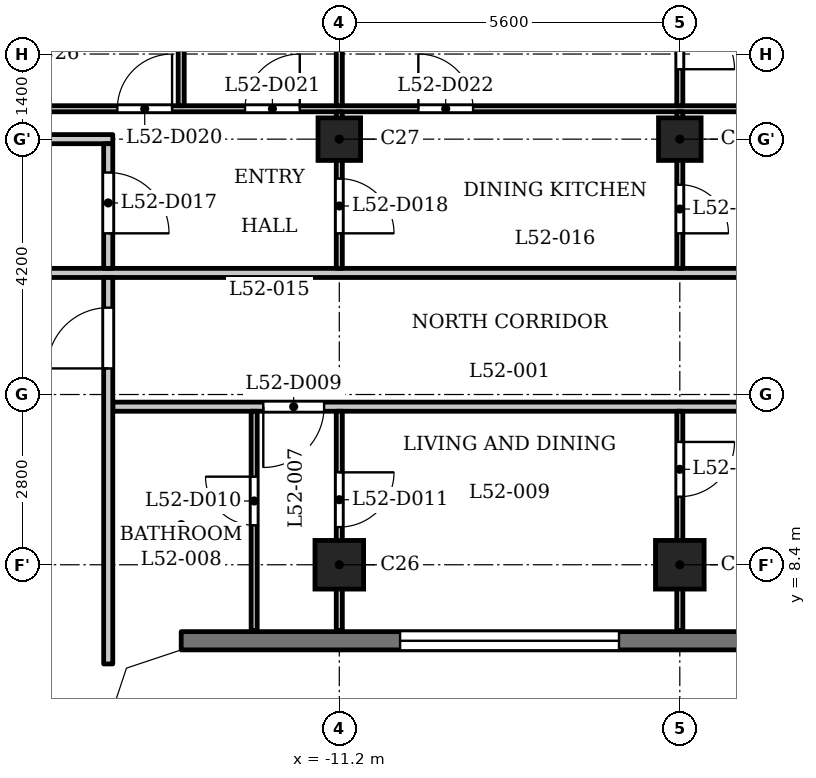
"""IFC4 building model, lengths in metres.
Left out: names, types, materials, properties, quantities, classifications, styles, units other than length and angle.
Written with IfcOpenShell. Run it as: python <this file> out.ifc"""

import sys

from ifc_helpers import new_model, si_unit, direction, frame, frame_2d, origin, origin_2d, place, context, subcontext, project, spatial, polyline, rectangle, outline, extrude, element, fill, save


model = new_model("IFC4")
c1 = context("Model", 3, precision=1e-05, world=origin(), true_north=direction((0.0, 1.0)))
c2 = subcontext(c1, "Body", "Model", "MODEL_VIEW")
j1 = project(units=[si_unit("LENGTHUNIT", "METRE"), si_unit("PLANEANGLEUNIT", "RADIAN")], contexts=[c1])
p1 = place(None, origin())
s1 = spatial("IfcSite", under=j1, at=p1, CompositionType="ELEMENT")
p2 = place(p1, origin())
s2 = spatial("IfcBuilding", under=s1, at=p2, CompositionType="ELEMENT")
p3 = place(p2, frame((0.0, 0.0, 202.9)))
s3 = spatial("IfcBuildingStorey", under=s2, at=p3, CompositionType="ELEMENT", Elevation=202.9)
for number, where, z_axis, x_axis in (
    (1, (-11.2, 8.4, 0.0), (0.0, 0.0, 1.0), (1.0, 0.0, 0.0)),
    (2, (-5.6, 8.4, 0.0), (0.0, 0.0, 1.0), (1.0, 0.0, 0.0)),
):
    element("IfcColumn", number, at=place(p3, frame(where, z_axis=z_axis, x_axis=x_axis)), inside=s3, PredefinedType="COLUMN", context=c2, shape_type="SweptSolid", body=[
        extrude(rectangle(XDim=0.8, YDim=0.8, at=origin_2d()), origin(), (0.0, 0.0, 1.0), 3.5),
    ])
for number, where, z_axis, x_axis in (
    (3, (-11.2, 15.4, 0.0), (0.0, 0.0, 1.0), (1.0, 0.0, 0.0)),
    (4, (-5.6, 15.4, 0.0), (0.0, 0.0, 1.0), (1.0, 0.0, 0.0)),
):
    element("IfcColumn", number, at=place(p3, frame(where, z_axis=z_axis, x_axis=x_axis)), inside=s3, PredefinedType="COLUMN", context=c2, shape_type="SweptSolid", body=[
        extrude(rectangle(XDim=0.7, YDim=0.7, at=origin_2d()), origin(), (0.0, 0.0, 1.0), 3.5),
    ])
p4 = place(p3, frame((-13.8, 7.15, 0.0), z_axis=(0.0, 0.0, 1.0), x_axis=(1.0, 0.0, 0.0)))
e5 = element("IfcWall", 5, at=p4, inside=s3, PredefinedType="SOLIDWALL", context=c2, shape_type="SweptSolid", body=[
    extrude(rectangle(XDim=27.6, YDim=0.3, at=frame_2d((13.8, 0.0))), origin(), (0.0, 0.0, 1.0), 3.2),
])
p5 = place(p4, frame((3.6, 0.0, 1.2)))
e6 = element("IfcOpeningElement", 6, at=p5, cuts=e5, PredefinedType="OPENING", context=c2, shape_type="SweptSolid", body=[
    extrude(rectangle(XDim=3.6, YDim=0.95, at=frame_2d((1.8, 0.475))), frame((0.0, 0.16, 0.0), z_axis=(0.0, -1.0, 0.0), x_axis=(1.0, 0.0, 0.0)), (0.0, 0.0, 1.0), 0.32),
])
p6 = place(p4, frame((9.2, 0.0, 1.2)))
e7 = element("IfcOpeningElement", 7, at=p6, cuts=e5, PredefinedType="OPENING", context=c2, shape_type="SweptSolid", body=[
    extrude(rectangle(XDim=3.6, YDim=0.95, at=frame_2d((1.8, 0.475))), frame((0.0, 0.16, 0.0), z_axis=(0.0, -1.0, 0.0), x_axis=(1.0, 0.0, 0.0)), (0.0, 0.0, 1.0), 0.32),
])
p7 = place(p4, frame((14.4, 0.0, 0.6)))
e8 = element("IfcOpeningElement", 8, at=p7, cuts=e5, PredefinedType="OPENING", context=c2, shape_type="SweptSolid", body=[
    extrude(rectangle(XDim=1.2, YDim=1.55, at=frame_2d((0.6, 0.775))), frame((0.0, 0.16, 0.0), z_axis=(0.0, -1.0, 0.0), x_axis=(1.0, 0.0, 0.0)), (0.0, 0.0, 1.0), 0.32),
])
p8 = place(p4, frame((16.9, 0.0, 0.9)))
e9 = element("IfcOpeningElement", 9, at=p8, cuts=e5, PredefinedType="OPENING", context=c2, shape_type="SweptSolid", body=[
    extrude(rectangle(XDim=1.8, YDim=1.25, at=frame_2d((0.9, 0.625))), frame((0.0, 0.16, 0.0), z_axis=(0.0, -1.0, 0.0), x_axis=(1.0, 0.0, 0.0)), (0.0, 0.0, 1.0), 0.32),
])
p9 = place(p4, frame((20.4, 0.0, 1.2)))
e10 = element("IfcOpeningElement", 10, at=p9, cuts=e5, PredefinedType="OPENING", context=c2, shape_type="SweptSolid", body=[
    extrude(rectangle(XDim=3.6, YDim=0.95, at=frame_2d((1.8, 0.475))), frame((0.0, 0.16, 0.0), z_axis=(0.0, -1.0, 0.0), x_axis=(1.0, 0.0, 0.0)), (0.0, 0.0, 1.0), 0.32),
])
p10 = place(p4, frame((25.438, 0.0, 0.9)))
e11 = element("IfcOpeningElement", 11, at=p10, cuts=e5, PredefinedType="OPENING", context=c2, shape_type="SweptSolid", body=[
    extrude(rectangle(XDim=1.8, YDim=1.25, at=frame_2d((0.9, 0.625))), frame((0.0, 0.16, 0.0), z_axis=(0.0, -1.0, 0.0), x_axis=(1.0, 0.0, 0.0)), (0.0, 0.0, 1.0), 0.32),
])
p11 = place(p3, frame((-14.925, 11.0, 0.0), z_axis=(0.0, 0.0, 1.0), x_axis=(1.0, 0.0, 0.0)))
e12 = element("IfcWall", 12, at=p11, inside=s3, PredefinedType="PARTITIONING", context=c2, shape_type="SweptSolid", body=[
    extrude(rectangle(XDim=29.85, YDim=0.15, at=frame_2d((14.925, 0.0))), origin(), (0.0, 0.0, 1.0), 3.2),
])
p12 = place(p11, frame((2.475, 0.0, 0.0)))
e13 = element("IfcOpeningElement", 13, at=p12, cuts=e12, PredefinedType="OPENING", context=c2, shape_type="SweptSolid", body=[
    extrude(rectangle(XDim=1.0, YDim=2.1, at=frame_2d((0.5, 1.05))), frame((0.0, 0.085, 0.0), z_axis=(0.0, -1.0, 0.0), x_axis=(1.0, 0.0, 0.0)), (0.0, 0.0, 1.0), 0.17),
])
p13 = place(p11, frame((17.975, 0.0, 0.0)))
e14 = element("IfcOpeningElement", 14, at=p13, cuts=e12, PredefinedType="OPENING", context=c2, shape_type="SweptSolid", body=[
    extrude(rectangle(XDim=1.0, YDim=2.1, at=frame_2d((0.5, 1.05))), frame((0.0, 0.085, 0.0), z_axis=(0.0, -1.0, 0.0), x_axis=(1.0, 0.0, 0.0)), (0.0, 0.0, 1.0), 0.17),
])
p14 = place(p3, frame((-17.4, 13.2, 0.0), z_axis=(0.0, 0.0, 1.0), x_axis=(1.0, 0.0, 0.0)))
e15 = element("IfcWall", 15, at=p14, inside=s3, PredefinedType="PARTITIONING", context=c2, shape_type="SweptSolid", body=[
    extrude(rectangle(XDim=34.8, YDim=0.15, at=frame_2d((17.4, 0.0))), origin(), (0.0, 0.0, 1.0), 3.2),
])
p15 = place(p14, frame((0.25, 0.0, 0.0)))
e16 = element("IfcOpeningElement", 16, at=p15, cuts=e15, PredefinedType="OPENING", context=c2, shape_type="SweptSolid", body=[
    extrude(rectangle(XDim=1.0, YDim=2.1, at=frame_2d((0.5, 1.05))), frame((0.0, 0.085, 0.0), z_axis=(0.0, -1.0, 0.0), x_axis=(1.0, 0.0, 0.0)), (0.0, 0.0, 1.0), 0.17),
])
p16 = place(p14, frame((33.65, 0.0, 0.0)))
e17 = element("IfcOpeningElement", 17, at=p16, cuts=e15, PredefinedType="OPENING", context=c2, shape_type="SweptSolid", body=[
    extrude(rectangle(XDim=1.0, YDim=2.1, at=frame_2d((0.5, 1.05))), frame((0.0, 0.085, 0.0), z_axis=(0.0, -1.0, 0.0), x_axis=(1.0, 0.0, 0.0)), (0.0, 0.0, 1.0), 0.17),
])
p17 = place(p3, frame((-24.684, 15.4, 0.0), z_axis=(0.0, 0.0, 1.0), x_axis=(1.0, 0.0, 0.0)))
e18 = element("IfcWall", 18, at=p17, inside=s3, PredefinedType="PARTITIONING", context=c2, shape_type="SweptSolid", body=[
    extrude(rectangle(XDim=9.759, YDim=0.15, at=frame_2d((4.879, 0.0))), origin(), (0.0, 0.0, 1.0), 3.2),
])
p18 = place(p17, frame((0.984, 0.0, 0.0)))
e19 = element("IfcOpeningElement", 19, at=p18, cuts=e18, PredefinedType="OPENING", context=c2, shape_type="SweptSolid", body=[
    extrude(rectangle(XDim=1.0, YDim=2.1, at=frame_2d((0.5, 1.05))), frame((0.0, 0.085, 0.0), z_axis=(0.0, -1.0, 0.0), x_axis=(1.0, 0.0, 0.0)), (0.0, 0.0, 1.0), 0.17),
])
p19 = place(p3, frame((-16.725, 15.9, 0.0), z_axis=(0.0, 0.0, 1.0), x_axis=(1.0, 0.0, 0.0)))
e20 = element("IfcWall", 20, at=p19, inside=s3, PredefinedType="PARTITIONING", context=c2, shape_type="SweptSolid", body=[
    extrude(rectangle(XDim=33.45, YDim=0.1, at=frame_2d((16.725, 0.0))), origin(), (0.0, 0.0, 1.0), 3.2),
])
p20 = place(p19, frame((1.875, 0.0, 0.0)))
e21 = element("IfcOpeningElement", 21, at=p20, cuts=e20, PredefinedType="OPENING", context=c2, shape_type="SweptSolid", body=[
    extrude(rectangle(XDim=0.9, YDim=2.1, at=frame_2d((0.45, 1.05))), frame((0.0, 0.06, 0.0), z_axis=(0.0, -1.0, 0.0), x_axis=(1.0, 0.0, 0.0)), (0.0, 0.0, 1.0), 0.12),
])
p21 = place(p19, frame((3.975, 0.0, 0.0)))
e22 = element("IfcOpeningElement", 22, at=p21, cuts=e20, PredefinedType="OPENING", context=c2, shape_type="SweptSolid", body=[
    extrude(rectangle(XDim=0.9, YDim=2.1, at=frame_2d((0.45, 1.05))), frame((0.0, 0.06, 0.0), z_axis=(0.0, -1.0, 0.0), x_axis=(1.0, 0.0, 0.0)), (0.0, 0.0, 1.0), 0.12),
])
p22 = place(p19, frame((6.825, 0.0, 0.0)))
e23 = element("IfcOpeningElement", 23, at=p22, cuts=e20, PredefinedType="OPENING", context=c2, shape_type="SweptSolid", body=[
    extrude(rectangle(XDim=0.9, YDim=2.1, at=frame_2d((0.45, 1.05))), frame((0.0, 0.06, 0.0), z_axis=(0.0, -1.0, 0.0), x_axis=(1.0, 0.0, 0.0)), (0.0, 0.0, 1.0), 0.12),
])
p23 = place(p19, frame((28.975, 0.0, 0.0)))
e24 = element("IfcOpeningElement", 24, at=p23, cuts=e20, PredefinedType="OPENING", context=c2, shape_type="SweptSolid", body=[
    extrude(rectangle(XDim=0.9, YDim=2.1, at=frame_2d((0.45, 1.05))), frame((0.0, 0.06, 0.0), z_axis=(0.0, -1.0, 0.0), x_axis=(1.0, 0.0, 0.0)), (0.0, 0.0, 1.0), 0.12),
])
p24 = place(p19, frame((30.725, 0.0, 0.0)))
e25 = element("IfcOpeningElement", 25, at=p24, cuts=e20, PredefinedType="OPENING", context=c2, shape_type="SweptSolid", body=[
    extrude(rectangle(XDim=0.9, YDim=2.1, at=frame_2d((0.45, 1.05))), frame((0.0, 0.06, 0.0), z_axis=(0.0, -1.0, 0.0), x_axis=(1.0, 0.0, 0.0)), (0.0, 0.0, 1.0), 0.12),
])
p25 = place(p19, frame((25.625, 0.0, 0.0)))
e26 = element("IfcOpeningElement", 26, at=p25, cuts=e20, PredefinedType="OPENING", context=c2, shape_type="SweptSolid", body=[
    extrude(rectangle(XDim=0.9, YDim=2.1, at=frame_2d((0.45, 1.05))), frame((0.0, 0.06, 0.0), z_axis=(0.0, -1.0, 0.0), x_axis=(1.0, 0.0, 0.0)), (0.0, 0.0, 1.0), 0.12),
])
p26 = place(p3, frame((-15.0, 6.769, 0.0), z_axis=(0.0, 0.0, 1.0), x_axis=(0.0, 1.0, 0.0)))
e27 = element("IfcWall", 27, at=p26, inside=s3, PredefinedType="PARTITIONING", context=c2, shape_type="SweptSolid", body=[
    extrude(rectangle(XDim=6.356, YDim=0.15, at=frame_2d((3.178, 0.0))), origin(), (0.0, 0.0, 1.0), 3.2),
])
p27 = place(p26, frame((4.86, 0.0, 0.0)))
e28 = element("IfcOpeningElement", 28, at=p27, cuts=e27, PredefinedType="OPENING", context=c2, shape_type="SweptSolid", body=[
    extrude(rectangle(XDim=1.0, YDim=2.1, at=frame_2d((0.5, 1.05))), frame((0.0, 0.085, 0.0), z_axis=(0.0, -1.0, 0.0), x_axis=(1.0, 0.0, 0.0)), (0.0, 0.0, 1.0), 0.17),
])
p28 = place(p3, frame((-15.0, 13.275, 0.0), z_axis=(0.0, 0.0, 1.0), x_axis=(0.0, 1.0, 0.0)))
e29 = element("IfcWall", 29, at=p28, inside=s3, PredefinedType="PARTITIONING", context=c2, shape_type="SweptSolid", body=[
    extrude(rectangle(XDim=2.05, YDim=0.15, at=frame_2d((1.025, 0.0))), origin(), (0.0, 0.0, 1.0), 3.2),
])
p29 = place(p28, frame((0.576, 0.0, 0.0)))
e30 = element("IfcOpeningElement", 30, at=p29, cuts=e29, PredefinedType="OPENING", context=c2, shape_type="SweptSolid", body=[
    extrude(rectangle(XDim=1.0, YDim=2.1, at=frame_2d((0.5, 1.05))), frame((0.0, 0.085, 0.0), z_axis=(0.0, -1.0, 0.0), x_axis=(1.0, 0.0, 0.0)), (0.0, 0.0, 1.0), 0.17),
])
p30 = place(p3, frame((-13.8, 15.95, 0.0), z_axis=(0.0, 0.0, 1.0), x_axis=(0.0, 1.0, 0.0)))
e31 = element("IfcWall", 31, at=p30, inside=s3, PredefinedType="PARTITIONING", context=c2, shape_type="SweptSolid", body=[
    extrude(rectangle(XDim=6.88, YDim=0.1, at=frame_2d((3.44, 0.0))), origin(), (0.0, 0.0, 1.0), 3.2),
])
p31 = place(p3, frame((-12.6, 7.32, 0.0), z_axis=(0.0, 0.0, 1.0), x_axis=(0.0, 1.0, 0.0)))
e32 = element("IfcWall", 32, at=p31, inside=s3, PredefinedType="PARTITIONING", context=c2, shape_type="SweptSolid", body=[
    extrude(rectangle(XDim=3.605, YDim=0.1, at=frame_2d((1.802, 0.0))), origin(), (0.0, 0.0, 1.0), 3.2),
])
p32 = place(p31, frame((1.729, 0.0, 0.0)))
e33 = element("IfcOpeningElement", 33, at=p32, cuts=e32, PredefinedType="OPENING", context=c2, shape_type="SweptSolid", body=[
    extrude(rectangle(XDim=0.8, YDim=2.1, at=frame_2d((0.4, 1.05))), frame((0.0, 0.06, 0.0), z_axis=(0.0, -1.0, 0.0), x_axis=(1.0, 0.0, 0.0)), (0.0, 0.0, 1.0), 0.12),
])
p33 = place(p3, frame((-11.2, 7.32, 0.0), z_axis=(0.0, 0.0, 1.0), x_axis=(0.0, 1.0, 0.0)))
e34 = element("IfcWall", 34, at=p33, inside=s3, PredefinedType="PARTITIONING", context=c2, shape_type="SweptSolid", body=[
    extrude(rectangle(XDim=3.605, YDim=0.1, at=frame_2d((1.802, 0.0))), origin(), (0.0, 0.0, 1.0), 3.2),
])
p34 = place(p33, frame((1.7, 0.0, 0.0)))
e35 = element("IfcOpeningElement", 35, at=p34, cuts=e34, PredefinedType="OPENING", context=c2, shape_type="SweptSolid", body=[
    extrude(rectangle(XDim=0.9, YDim=2.1, at=frame_2d((0.45, 1.05))), frame((0.0, 0.06, 0.0), z_axis=(0.0, -1.0, 0.0), x_axis=(1.0, 0.0, 0.0)), (0.0, 0.0, 1.0), 0.12),
])
p35 = place(p3, frame((-11.2, 13.275, 0.0), z_axis=(0.0, 0.0, 1.0), x_axis=(0.0, 1.0, 0.0)))
e36 = element("IfcWall", 36, at=p35, inside=s3, PredefinedType="PARTITIONING", context=c2, shape_type="SweptSolid", body=[
    extrude(rectangle(XDim=2.575, YDim=0.1, at=frame_2d((1.288, 0.0))), origin(), (0.0, 0.0, 1.0), 3.2),
])
p36 = place(p35, frame((0.576, 0.0, 0.0)))
e37 = element("IfcOpeningElement", 37, at=p36, cuts=e36, PredefinedType="OPENING", context=c2, shape_type="SweptSolid", body=[
    extrude(rectangle(XDim=0.9, YDim=2.1, at=frame_2d((0.45, 1.05))), frame((0.0, 0.06, 0.0), z_axis=(0.0, -1.0, 0.0), x_axis=(1.0, 0.0, 0.0)), (0.0, 0.0, 1.0), 0.12),
])
p37 = place(p3, frame((-11.2, 15.95, 0.0), z_axis=(0.0, 0.0, 1.0), x_axis=(0.0, 1.0, 0.0)))
e38 = element("IfcWall", 38, at=p37, inside=s3, PredefinedType="PARTITIONING", context=c2, shape_type="SweptSolid", body=[
    extrude(rectangle(XDim=6.13, YDim=0.1, at=frame_2d((3.065, 0.0))), origin(), (0.0, 0.0, 1.0), 3.2),
])
p38 = place(p3, frame((-5.6, 7.32, 0.0), z_axis=(0.0, 0.0, 1.0), x_axis=(0.0, 1.0, 0.0)))
e39 = element("IfcWall", 39, at=p38, inside=s3, PredefinedType="PARTITIONING", context=c2, shape_type="SweptSolid", body=[
    extrude(rectangle(XDim=3.605, YDim=0.1, at=frame_2d((1.802, 0.0))), origin(), (0.0, 0.0, 1.0), 3.2),
])
p39 = place(p38, frame((2.2, 0.0, 0.0)))
e40 = element("IfcOpeningElement", 40, at=p39, cuts=e39, PredefinedType="OPENING", context=c2, shape_type="SweptSolid", body=[
    extrude(rectangle(XDim=0.9, YDim=2.1, at=frame_2d((0.45, 1.05))), frame((0.0, 0.06, 0.0), z_axis=(0.0, -1.0, 0.0), x_axis=(1.0, 0.0, 0.0)), (0.0, 0.0, 1.0), 0.12),
])
p40 = place(p3, frame((-5.6, 13.275, 0.0), z_axis=(0.0, 0.0, 1.0), x_axis=(0.0, 1.0, 0.0)))
e41 = element("IfcWall", 41, at=p40, inside=s3, PredefinedType="PARTITIONING", context=c2, shape_type="SweptSolid", body=[
    extrude(rectangle(XDim=2.575, YDim=0.1, at=frame_2d((1.288, 0.0))), origin(), (0.0, 0.0, 1.0), 3.2),
])
p41 = place(p40, frame((0.576, 0.0, 0.0)))
e42 = element("IfcOpeningElement", 42, at=p41, cuts=e41, PredefinedType="OPENING", context=c2, shape_type="SweptSolid", body=[
    extrude(rectangle(XDim=0.8, YDim=2.1, at=frame_2d((0.4, 1.05))), frame((0.0, 0.06, 0.0), z_axis=(0.0, -1.0, 0.0), x_axis=(1.0, 0.0, 0.0)), (0.0, 0.0, 1.0), 0.12),
])
p42 = place(p3, frame((-5.6, 15.95, 0.0), z_axis=(0.0, 0.0, 1.0), x_axis=(0.0, 1.0, 0.0)))
e43 = element("IfcWall", 43, at=p42, inside=s3, PredefinedType="PARTITIONING", context=c2, shape_type="SweptSolid", body=[
    extrude(rectangle(XDim=6.13, YDim=0.1, at=frame_2d((3.065, 0.0))), origin(), (0.0, 0.0, 1.0), 3.2),
])
p43 = place(p42, frame((0.6, 0.0, 0.0)))
e44 = element("IfcOpeningElement", 44, at=p43, cuts=e43, PredefinedType="OPENING", context=c2, shape_type="SweptSolid", body=[
    extrude(rectangle(XDim=0.9, YDim=2.1, at=frame_2d((0.45, 1.05))), frame((0.0, 0.06, 0.0), z_axis=(0.0, -1.0, 0.0), x_axis=(1.0, 0.0, 0.0)), (0.0, 0.0, 1.0), 0.12),
])
p44 = place(p3, origin())
e45 = element("IfcWall", 45, at=p44, inside=s3, PredefinedType="SOLIDWALL", context=c2, shape_type="SweptSolid", body=[
    extrude(outline(polyline([(-13.849, 7.3), (-14.937, 6.937), (-15.3, 5.849), (-15.3, 5.8), (-15.0, 5.8), (-14.7, 6.7), (-13.8, 7.0), (-13.8, 7.3), (-13.849, 7.3)])), origin(), (0.0, 0.0, 1.0), 3.2),
])
p45 = place(p27, origin())
e46 = element("IfcDoor", 46, at=p45, inside=s3, OperationType="SINGLE_SWING_RIGHT", PredefinedType="DOOR", context=c2, shape_type="SweptSolid", body=[
    extrude(rectangle(XDim=1.0, YDim=2.1, at=frame_2d((0.5, 1.05))), frame((0.0, 0.025, 0.0), z_axis=(0.0, -1.0, 0.0), x_axis=(1.0, 0.0, 0.0)), (0.0, 0.0, 1.0), 0.05),
])
fill(e28, e46)
p46 = place(p12, origin())
e47 = element("IfcDoor", 47, at=p46, inside=s3, OperationType="SINGLE_SWING_LEFT", PredefinedType="DOOR", context=c2, shape_type="SweptSolid", body=[
    extrude(rectangle(XDim=1.0, YDim=2.1, at=frame_2d((0.5, 1.05))), frame((0.0, 0.025, 0.0), z_axis=(0.0, -1.0, 0.0), x_axis=(1.0, 0.0, 0.0)), (0.0, 0.0, 1.0), 0.05),
])
fill(e13, e47)
p47 = place(p32, origin())
e48 = element("IfcDoor", 48, at=p47, inside=s3, OperationType="SINGLE_SWING_LEFT", PredefinedType="DOOR", context=c2, shape_type="SweptSolid", body=[
    extrude(rectangle(XDim=0.8, YDim=2.1, at=frame_2d((0.4, 1.05))), frame((0.0, 0.025, 0.0), z_axis=(0.0, -1.0, 0.0), x_axis=(1.0, 0.0, 0.0)), (0.0, 0.0, 1.0), 0.05),
])
fill(e33, e48)
p48 = place(p34, origin())
e49 = element("IfcDoor", 49, at=p48, inside=s3, OperationType="SINGLE_SWING_RIGHT", PredefinedType="DOOR", context=c2, shape_type="SweptSolid", body=[
    extrude(rectangle(XDim=0.9, YDim=2.1, at=frame_2d((0.45, 1.05))), frame((0.0, 0.025, 0.0), z_axis=(0.0, -1.0, 0.0), x_axis=(1.0, 0.0, 0.0)), (0.0, 0.0, 1.0), 0.05),
])
fill(e35, e49)
p49 = place(p39, origin())
e50 = element("IfcDoor", 50, at=p49, inside=s3, OperationType="SINGLE_SWING_RIGHT", PredefinedType="DOOR", context=c2, shape_type="SweptSolid", body=[
    extrude(rectangle(XDim=0.9, YDim=2.1, at=frame_2d((0.45, 1.05))), frame((0.0, 0.025, 0.0), z_axis=(0.0, -1.0, 0.0), x_axis=(1.0, 0.0, 0.0)), (0.0, 0.0, 1.0), 0.05),
])
fill(e40, e50)
p50 = place(p29, origin())
e51 = element("IfcDoor", 51, at=p50, inside=s3, OperationType="SINGLE_SWING_LEFT", PredefinedType="DOOR", context=c2, shape_type="SweptSolid", body=[
    extrude(rectangle(XDim=1.0, YDim=2.1, at=frame_2d((0.5, 1.05))), frame((0.0, 0.025, 0.0), z_axis=(0.0, -1.0, 0.0), x_axis=(1.0, 0.0, 0.0)), (0.0, 0.0, 1.0), 0.05),
])
fill(e30, e51)
p51 = place(p36, origin())
e52 = element("IfcDoor", 52, at=p51, inside=s3, OperationType="SINGLE_SWING_LEFT", PredefinedType="DOOR", context=c2, shape_type="SweptSolid", body=[
    extrude(rectangle(XDim=0.9, YDim=2.1, at=frame_2d((0.45, 1.05))), frame((0.0, 0.025, 0.0), z_axis=(0.0, -1.0, 0.0), x_axis=(1.0, 0.0, 0.0)), (0.0, 0.0, 1.0), 0.05),
])
fill(e37, e52)
p52 = place(p41, origin())
e53 = element("IfcDoor", 53, at=p52, inside=s3, OperationType="SINGLE_SWING_LEFT", PredefinedType="DOOR", context=c2, shape_type="SweptSolid", body=[
    extrude(rectangle(XDim=0.8, YDim=2.1, at=frame_2d((0.4, 1.05))), frame((0.0, 0.025, 0.0), z_axis=(0.0, -1.0, 0.0), x_axis=(1.0, 0.0, 0.0)), (0.0, 0.0, 1.0), 0.05),
])
fill(e42, e53)
p53 = place(p20, origin())
e54 = element("IfcDoor", 54, at=p53, inside=s3, OperationType="SINGLE_SWING_LEFT", PredefinedType="DOOR", context=c2, shape_type="SweptSolid", body=[
    extrude(rectangle(XDim=0.9, YDim=2.1, at=frame_2d((0.45, 1.05))), frame((0.0, 0.025, 0.0), z_axis=(0.0, -1.0, 0.0), x_axis=(1.0, 0.0, 0.0)), (0.0, 0.0, 1.0), 0.05),
])
fill(e21, e54)
p54 = place(p21, origin())
e55 = element("IfcDoor", 55, at=p54, inside=s3, OperationType="SINGLE_SWING_LEFT", PredefinedType="DOOR", context=c2, shape_type="SweptSolid", body=[
    extrude(rectangle(XDim=0.9, YDim=2.1, at=frame_2d((0.45, 1.05))), frame((0.0, 0.025, 0.0), z_axis=(0.0, -1.0, 0.0), x_axis=(1.0, 0.0, 0.0)), (0.0, 0.0, 1.0), 0.05),
])
fill(e22, e55)
p55 = place(p22, origin())
e56 = element("IfcDoor", 56, at=p55, inside=s3, OperationType="SINGLE_SWING_RIGHT", PredefinedType="DOOR", context=c2, shape_type="SweptSolid", body=[
    extrude(rectangle(XDim=0.9, YDim=2.1, at=frame_2d((0.45, 1.05))), frame((0.0, 0.025, 0.0), z_axis=(0.0, -1.0, 0.0), x_axis=(1.0, 0.0, 0.0)), (0.0, 0.0, 1.0), 0.05),
])
fill(e23, e56)
p56 = place(p43, origin())
e57 = element("IfcDoor", 57, at=p56, inside=s3, OperationType="SINGLE_SWING_LEFT", PredefinedType="DOOR", context=c2, shape_type="SweptSolid", body=[
    extrude(rectangle(XDim=0.9, YDim=2.1, at=frame_2d((0.45, 1.05))), frame((0.0, 0.025, 0.0), z_axis=(0.0, -1.0, 0.0), x_axis=(1.0, 0.0, 0.0)), (0.0, 0.0, 1.0), 0.05),
])
fill(e44, e57)
p57 = place(p5, origin())
e58 = element("IfcWindow", 58, at=p57, inside=s3, PartitioningType="SINGLE_PANEL", PredefinedType="WINDOW", context=c2, shape_type="SweptSolid", body=[
    extrude(rectangle(XDim=3.6, YDim=0.95, at=frame_2d((1.8, 0.475))), frame((0.0, 0.03, 0.0), z_axis=(0.0, -1.0, 0.0), x_axis=(1.0, 0.0, 0.0)), (0.0, 0.0, 1.0), 0.06),
])
fill(e6, e58)
save(model, sys.argv[1])
